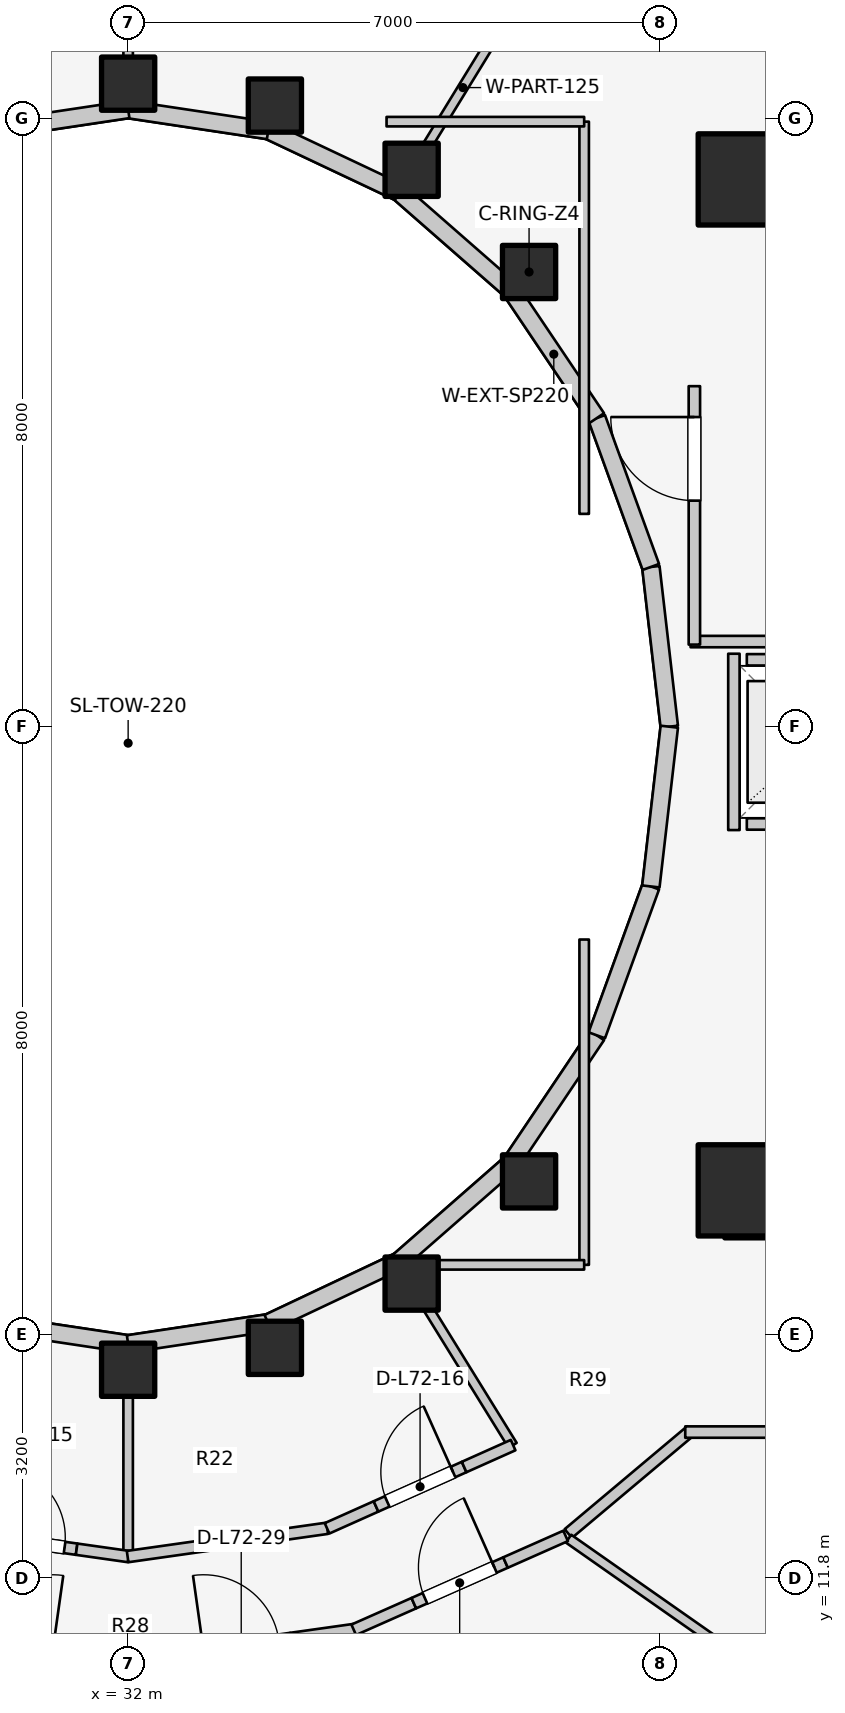
"""IFC4 building model, lengths in metres.
Left out: names, types, materials, properties, quantities, classifications, styles, units other than length and angle.
Written with IfcOpenShell. Run it as: python <this file> out.ifc"""

import sys

from ifc_helpers import new_model, si_unit, direction, frame, frame_2d, origin, origin_2d, place, context, subcontext, project, spatial, rectangle, extrude, element, fill, save


model = new_model("IFC4")
c1 = context("Model", 3, precision=1e-05, world=origin(), true_north=direction((0.0, 1.0)))
c2 = subcontext(c1, "Body", "Model", "MODEL_VIEW")
j1 = project(units=[si_unit("LENGTHUNIT", "METRE"), si_unit("PLANEANGLEUNIT", "RADIAN")], contexts=[c1])
p1 = place(None, origin())
s1 = spatial("IfcSite", under=j1, at=p1, CompositionType="ELEMENT")
p2 = place(p1, origin())
s2 = spatial("IfcBuilding", under=s1, at=p2, CompositionType="ELEMENT")
p3 = place(p2, frame((0.0, 0.0, 235.7)))
s3 = spatial("IfcBuildingStorey", under=s2, at=p3, CompositionType="ELEMENT", Elevation=235.7)
for number, where, z_axis, x_axis in (
    (1, (39.85, 16.55, 0.0), (0.0, 0.0, 1.0), (1.0, 0.0, 0.0)),
    (2, (39.85, 30.35, 0.0), (0.0, 0.0, 1.0), (1.0, 0.0, 0.0)),
):
    element("IfcWall", number, at=place(p3, frame(where, z_axis=z_axis, x_axis=x_axis)), inside=s3, PredefinedType="SHEAR", context=c2, shape_type="SweptSolid", body=[
        extrude(rectangle(XDim=4.5, YDim=0.55, at=frame_2d((2.25, 0.0))), origin(), (0.0, 0.0, 1.0), 3.1),
    ])
for number, where, z_axis, x_axis in (
    (3, (40.1, 16.9, 0.0), (0.0, 0.0, 1.0), (1.0, 0.0, 0.0)),
    (4, (40.1, 30.2, 0.0), (0.0, 0.0, 1.0), (1.0, 0.0, 0.0)),
):
    element("IfcColumn", number, at=place(p3, frame(where, z_axis=z_axis, x_axis=x_axis)), inside=s3, PredefinedType="COLUMN", context=c2, shape_type="SweptSolid", body=[
        extrude(rectangle(XDim=1.2, YDim=1.2, at=origin_2d()), origin(), (0.0, 0.0, 1.0), 3.1),
    ])
for number, where, z_axis, x_axis in (
    (5, (37.275, 28.982, 0.0), (0.0, 0.0, 1.0), (1.0, 0.0, 0.0)),
    (6, (35.73, 30.327, 0.0), (0.0, 0.0, 1.0), (1.0, 0.0, 0.0)),
    (7, (33.931, 31.172, 0.0), (0.0, 0.0, 1.0), (1.0, 0.0, 0.0)),
    (8, (32.0, 31.46, 0.0), (0.0, 0.0, 1.0), (1.0, 0.0, 0.0)),
    (9, (32.0, 14.54, 0.0), (0.0, 0.0, 1.0), (1.0, 0.0, 0.0)),
    (10, (33.931, 14.828, 0.0), (0.0, 0.0, 1.0), (1.0, 0.0, 0.0)),
    (11, (35.73, 15.673, 0.0), (0.0, 0.0, 1.0), (1.0, 0.0, 0.0)),
    (12, (37.275, 17.018, 0.0), (0.0, 0.0, 1.0), (1.0, 0.0, 0.0)),
):
    element("IfcColumn", number, at=place(p3, frame(where, z_axis=z_axis, x_axis=x_axis)), inside=s3, PredefinedType="COLUMN", context=c2, shape_type="SweptSolid", body=[
        extrude(rectangle(XDim=0.7, YDim=0.7, at=origin_2d()), origin(), (0.0, 0.0, 1.0), 3.1),
    ])
p4 = place(p3, frame((39.12, 23.0, 0.0), z_axis=(0.0, 0.0, 1.0), x_axis=(-0.114711713601, 0.993398823617, 0.0)))
e13 = element("IfcWall", 13, at=p4, inside=s3, PredefinedType="STANDARD", context=c2, shape_type="SweptSolid", body=[
    extrude(rectangle(XDim=2.115, YDim=0.23, at=frame_2d((1.058, 0.0))), origin(), (0.0, 0.0, 1.0), 2.56),
])
p5 = place(p3, frame((38.877, 25.102, 0.0), z_axis=(0.0, 0.0, 1.0), x_axis=(-0.341423187295, 0.93990968033, 0.0)))
e14 = element("IfcWall", 14, at=p5, inside=s3, PredefinedType="STANDARD", context=c2, shape_type="SweptSolid", body=[
    extrude(rectangle(XDim=2.084, YDim=0.23, at=frame_2d((1.042, 0.0))), origin(), (0.0, 0.0, 1.0), 2.56),
])
p6 = place(p3, frame((38.166, 27.06, 0.0), z_axis=(0.0, 0.0, 1.0), x_axis=(-0.558197800898, 0.829707909492, 0.0)))
e15 = element("IfcWall", 15, at=p6, inside=s3, PredefinedType="STANDARD", context=c2, shape_type="SweptSolid", body=[
    extrude(rectangle(XDim=2.027, YDim=0.23, at=frame_2d((1.013, 0.0))), origin(), (0.0, 0.0, 1.0), 1.22),
])
p7 = place(p3, frame((37.035, 28.742, 0.0), z_axis=(0.0, 0.0, 1.0), x_axis=(-0.752576694707, 0.658504607869, 0.0)))
e16 = element("IfcWall", 16, at=p7, inside=s3, PredefinedType="STANDARD", context=c2, shape_type="SweptSolid", body=[
    extrude(rectangle(XDim=1.959, YDim=0.23, at=frame_2d((0.98, 0.0))), origin(), (0.0, 0.0, 1.0), 1.22),
])
p8 = place(p3, frame((35.56, 30.032, 0.0), z_axis=(0.0, 0.0, 1.0), x_axis=(-0.904179699603, 0.427152280606, 0.0)))
e17 = element("IfcWall", 17, at=p8, inside=s3, PredefinedType="STANDARD", context=c2, shape_type="SweptSolid", body=[
    extrude(rectangle(XDim=1.899, YDim=0.23, at=frame_2d((0.95, 0.0))), origin(), (0.0, 0.0, 1.0), 1.22),
])
for number, where, z_axis, x_axis in (
    (18, (33.843, 30.843, 0.0), (0.0, 0.0, 1.0), (-0.989, 0.149, 0.0)),
    (19, (32.0, 31.12, 0.0), (0.0, 0.0, 1.0), (-0.989, -0.149, 0.0)),
    (20, (30.157, 15.157, 0.0), (0.0, 0.0, 1.0), (0.989, -0.149, 0.0)),
    (21, (32.0, 14.88, 0.0), (0.0, 0.0, 1.0), (0.989, 0.149, 0.0)),
):
    element("IfcWall", number, at=place(p3, frame(where, z_axis=z_axis, x_axis=x_axis)), inside=s3, PredefinedType="STANDARD", context=c2, shape_type="SweptSolid", body=[
        extrude(rectangle(XDim=1.864, YDim=0.23, at=frame_2d((0.932, 0.0))), origin(), (0.0, 0.0, 1.0), 1.22),
    ])
p9 = place(p3, frame((33.843, 15.157, 0.0), z_axis=(0.0, 0.0, 1.0), x_axis=(0.904179699603, 0.427152280606, 0.0)))
e22 = element("IfcWall", 22, at=p9, inside=s3, PredefinedType="STANDARD", context=c2, shape_type="SweptSolid", body=[
    extrude(rectangle(XDim=1.899, YDim=0.23, at=frame_2d((0.95, 0.0))), origin(), (0.0, 0.0, 1.0), 1.22),
])
p10 = place(p3, frame((35.56, 15.968, 0.0), z_axis=(0.0, 0.0, 1.0), x_axis=(0.752576694707, 0.658504607869, 0.0)))
e23 = element("IfcWall", 23, at=p10, inside=s3, PredefinedType="STANDARD", context=c2, shape_type="SweptSolid", body=[
    extrude(rectangle(XDim=1.959, YDim=0.23, at=frame_2d((0.98, 0.0))), origin(), (0.0, 0.0, 1.0), 1.22),
])
p11 = place(p3, frame((37.035, 17.258, 0.0), z_axis=(0.0, 0.0, 1.0), x_axis=(0.558197800898, 0.829707909492, 0.0)))
e24 = element("IfcWall", 24, at=p11, inside=s3, PredefinedType="STANDARD", context=c2, shape_type="SweptSolid", body=[
    extrude(rectangle(XDim=2.027, YDim=0.23, at=frame_2d((1.013, 0.0))), origin(), (0.0, 0.0, 1.0), 1.22),
])
p12 = place(p3, frame((38.166, 18.94, 0.0), z_axis=(0.0, 0.0, 1.0), x_axis=(0.341423187295, 0.93990968033, 0.0)))
e25 = element("IfcWall", 25, at=p12, inside=s3, PredefinedType="STANDARD", context=c2, shape_type="SweptSolid", body=[
    extrude(rectangle(XDim=2.084, YDim=0.23, at=frame_2d((1.042, 0.0))), origin(), (0.0, 0.0, 1.0), 2.56),
])
p13 = place(p3, frame((38.877, 20.898, 0.0), z_axis=(0.0, 0.0, 1.0), x_axis=(0.114711713601, 0.993398823617, 0.0)))
e26 = element("IfcWall", 26, at=p13, inside=s3, PredefinedType="STANDARD", context=c2, shape_type="SweptSolid", body=[
    extrude(rectangle(XDim=2.115, YDim=0.23, at=frame_2d((1.058, 0.0))), origin(), (0.0, 0.0, 1.0), 2.56),
])
p14 = place(p3, frame((40.14, 21.72, 0.0), z_axis=(0.0, 0.0, 1.0), x_axis=(1.0, 0.0, 0.0)))
e27 = element("IfcWall", 27, at=p14, inside=s3, PredefinedType="SOLIDWALL", context=c2, shape_type="SweptSolid", body=[
    extrude(rectangle(XDim=1.82, YDim=0.15, at=frame_2d((0.91, 0.0))), origin(), (0.0, 0.0, 1.0), 2.12),
])
p15 = place(p14, frame((0.36, 0.0, 0.0)))
e28 = element("IfcOpeningElement", 28, at=p15, cuts=e27, PredefinedType="OPENING", context=c2, shape_type="SweptSolid", body=[
    extrude(rectangle(XDim=1.1, YDim=2.1, at=frame_2d((0.55, 1.05))), frame((0.0, 0.085, 0.0), z_axis=(0.0, -1.0, 0.0), x_axis=(1.0, 0.0, 0.0)), (0.0, 0.0, 1.0), 0.17),
])
p16 = place(p3, frame((40.14, 23.88, 0.0), z_axis=(0.0, 0.0, 1.0), x_axis=(1.0, 0.0, 0.0)))
e29 = element("IfcWall", 29, at=p16, inside=s3, PredefinedType="SOLIDWALL", context=c2, shape_type="SweptSolid", body=[
    extrude(rectangle(XDim=1.82, YDim=0.15, at=frame_2d((0.91, 0.0))), origin(), (0.0, 0.0, 1.0), 2.12),
])
p17 = place(p3, frame((39.97, 21.64, 0.0), z_axis=(0.0, 0.0, 1.0), x_axis=(0.0, 1.0, 0.0)))
e30 = element("IfcWall", 30, at=p17, inside=s3, PredefinedType="SOLIDWALL", context=c2, shape_type="SweptSolid", body=[
    extrude(rectangle(XDim=2.32, YDim=0.15, at=frame_2d((1.16, 0.0))), origin(), (0.0, 0.0, 1.0), 2.12),
])
p18 = place(p3, frame((39.4, 24.12, 0.0), z_axis=(0.0, 0.0, 1.0), x_axis=(1.0, 0.0, 0.0)))
e31 = element("IfcWall", 31, at=p18, inside=s3, PredefinedType="PARTITIONING", context=c2, shape_type="SweptSolid", body=[
    extrude(rectangle(XDim=5.08, YDim=0.15, at=frame_2d((2.54, 0.0))), origin(), (0.0, 0.0, 1.0), 2.12),
])
p19 = place(p3, frame((39.45, 24.08, 0.0), z_axis=(0.0, 0.0, 1.0), x_axis=(0.0, 1.0, 0.0)))
e32 = element("IfcWall", 32, at=p19, inside=s3, PredefinedType="PARTITIONING", context=c2, shape_type="SweptSolid", body=[
    extrude(rectangle(XDim=3.4, YDim=0.15, at=frame_2d((1.7, 0.0))), origin(), (0.0, 0.0, 1.0), 2.575),
])
p20 = place(p19, frame((1.894, 0.0, 0.0)))
e33 = element("IfcOpeningElement", 33, at=p20, cuts=e32, PredefinedType="OPENING", context=c2, shape_type="SweptSolid", body=[
    extrude(rectangle(XDim=1.1, YDim=2.1, at=frame_2d((0.55, 1.05))), frame((0.0, 0.085, 0.0), z_axis=(0.0, -1.0, 0.0), x_axis=(1.0, 0.0, 0.0)), (0.0, 0.0, 1.0), 0.17),
])
p21 = place(p3, frame((35.55, 30.015, 0.0), z_axis=(0.0, 0.0, 1.0), x_axis=(0.522763432117, 0.852477796802, 0.0)))
e34 = element("IfcWall", 34, at=p21, inside=s3, PredefinedType="PARTITIONING", context=c2, shape_type="SweptSolid", body=[
    extrude(rectangle(XDim=3.269, YDim=0.125, at=frame_2d((1.635, 0.0))), origin(), (0.0, 0.0, 1.0), 1.22),
])
p22 = place(p3, frame((32.0, 31.1, 0.0), z_axis=(0.0, 0.0, 1.0), x_axis=(0.0, 1.0, 0.0)))
e35 = element("IfcWall", 35, at=p22, inside=s3, PredefinedType="PARTITIONING", context=c2, shape_type="SweptSolid", body=[
    extrude(rectangle(XDim=3.218, YDim=0.125, at=frame_2d((1.609, 0.0))), origin(), (0.0, 0.0, 1.0), 1.22),
])
p23 = place(p3, frame((32.0, 14.9, 0.0), z_axis=(0.0, 0.0, 1.0), x_axis=(0.0, -1.0, 0.0)))
e36 = element("IfcWall", 36, at=p23, inside=s3, PredefinedType="PARTITIONING", context=c2, shape_type="SweptSolid", body=[
    extrude(rectangle(XDim=2.818, YDim=0.125, at=frame_2d((1.409, 0.0))), origin(), (0.0, 0.0, 1.0), 2.096),
])
p24 = place(p3, frame((35.55, 15.985, 0.0), z_axis=(0.0, 0.0, 1.0), x_axis=(0.52592395012, -0.850531597702, 0.0)))
e37 = element("IfcWall", 37, at=p24, inside=s3, PredefinedType="PARTITIONING", context=c2, shape_type="SweptSolid", body=[
    extrude(rectangle(XDim=2.869, YDim=0.125, at=frame_2d((1.435, 0.0))), origin(), (0.0, 0.0, 1.0), 2.096),
])
p25 = place(p3, frame((30.065, 12.357, 0.0), z_axis=(0.0, 0.0, 1.0), x_axis=(0.990102710588, -0.140344656064, 0.0)))
e38 = element("IfcWall", 38, at=p25, inside=s3, PredefinedType="PARTITIONING", context=c2, shape_type="SweptSolid", body=[
    extrude(rectangle(XDim=1.27, YDim=0.15, at=frame_2d((0.635, 0.0))), origin(), (0.0, 0.0, 1.0), 2.575),
])
p26 = place(p25, frame((0.16, 0.0, 0.0)))
e39 = element("IfcOpeningElement", 39, at=p26, cuts=e38, PredefinedType="OPENING", context=c2, shape_type="SweptSolid", body=[
    extrude(rectangle(XDim=0.95, YDim=2.1, at=frame_2d((0.475, 1.05))), frame((0.0, 0.085, 0.0), z_axis=(0.0, -1.0, 0.0), x_axis=(1.0, 0.0, 0.0)), (0.0, 0.0, 1.0), 0.17),
])
p27 = place(p3, frame((31.322, 12.179, 0.0), z_axis=(0.0, 0.0, 1.0), x_axis=(0.990090139669, -0.140433312754, 0.0)))
e40 = element("IfcWall", 40, at=p27, inside=s3, PredefinedType="PARTITIONING", context=c2, shape_type="SweptSolid", body=[
    extrude(rectangle(XDim=0.692, YDim=0.15, at=frame_2d((0.346, 0.0))), origin(), (0.0, 0.0, 1.0), 2.096),
])
p28 = place(p3, frame((31.993, 12.082, 0.0), z_axis=(0.0, 0.0, 1.0), x_axis=(0.990096156252, 0.140390887794, 0.0)))
e41 = element("IfcWall", 41, at=p28, inside=s3, PredefinedType="PARTITIONING", context=c2, shape_type="SweptSolid", body=[
    extrude(rectangle(XDim=2.654, YDim=0.15, at=frame_2d((1.327, 0.0))), origin(), (0.0, 0.0, 1.0), 2.096),
])
p29 = place(p3, frame((34.617, 12.454, 0.0), z_axis=(0.0, 0.0, 1.0), x_axis=(0.912953893823, 0.408062725269, 0.0)))
e42 = element("IfcWall", 42, at=p29, inside=s3, PredefinedType="PARTITIONING", context=c2, shape_type="SweptSolid", body=[
    extrude(rectangle(XDim=0.706, YDim=0.15, at=frame_2d((0.353, 0.0))), origin(), (0.0, 0.0, 1.0), 2.096),
])
p30 = place(p3, frame((35.261, 12.742, 0.0), z_axis=(0.0, 0.0, 1.0), x_axis=(0.912825795494, 0.408349197479, 0.0)))
e43 = element("IfcWall", 43, at=p30, inside=s3, PredefinedType="PARTITIONING", context=c2, shape_type="SweptSolid", body=[
    extrude(rectangle(XDim=1.27, YDim=0.15, at=frame_2d((0.635, 0.0))), origin(), (0.0, 0.0, 1.0), 2.16),
])
p31 = place(p30, frame((0.16, 0.0, 0.0)))
e44 = element("IfcOpeningElement", 44, at=p31, cuts=e43, PredefinedType="OPENING", context=c2, shape_type="SweptSolid", body=[
    extrude(rectangle(XDim=0.95, YDim=2.1, at=frame_2d((0.475, 1.05))), frame((0.0, 0.085, 0.0), z_axis=(0.0, -1.0, 0.0), x_axis=(1.0, 0.0, 0.0)), (0.0, 0.0, 1.0), 0.17),
])
p32 = place(p3, frame((36.421, 13.26, 0.0), z_axis=(0.0, 0.0, 1.0), x_axis=(0.912825035427, 0.40835089653, 0.0)))
e45 = element("IfcWall", 45, at=p32, inside=s3, PredefinedType="PARTITIONING", context=c2, shape_type="SweptSolid", body=[
    extrude(rectangle(XDim=0.706, YDim=0.15, at=frame_2d((0.353, 0.0))), origin(), (0.0, 0.0, 1.0), 2.575),
])
p33 = place(p3, frame((38.0, 25.8, 0.0), z_axis=(0.0, 0.0, 1.0), x_axis=(0.0, 1.0, 0.0)))
e46 = element("IfcWall", 46, at=p33, inside=s3, PredefinedType="PARTITIONING", context=c2, shape_type="SweptSolid", body=[
    extrude(rectangle(XDim=5.16, YDim=0.125, at=frame_2d((2.58, 0.0))), origin(), (0.0, 0.0, 1.0), 1.952),
])
p34 = place(p3, frame((35.4, 30.96, 0.0), z_axis=(0.0, 0.0, 1.0), x_axis=(1.0, 0.0, 0.0)))
e47 = element("IfcWall", 47, at=p34, inside=s3, PredefinedType="PARTITIONING", context=c2, shape_type="SweptSolid", body=[
    extrude(rectangle(XDim=2.6, YDim=0.125, at=frame_2d((1.3, 0.0))), origin(), (0.0, 0.0, 1.0), 1.22),
])
p35 = place(p3, frame((38.0, 15.92, 0.0), z_axis=(0.0, 0.0, 1.0), x_axis=(0.0, 1.0, 0.0)))
e48 = element("IfcWall", 48, at=p35, inside=s3, PredefinedType="PARTITIONING", context=c2, shape_type="SweptSolid", body=[
    extrude(rectangle(XDim=4.28, YDim=0.125, at=frame_2d((2.14, 0.0))), origin(), (0.0, 0.0, 1.0), 1.952),
])
p36 = place(p3, frame((35.4, 15.92, 0.0), z_axis=(0.0, 0.0, 1.0), x_axis=(1.0, 0.0, 0.0)))
e49 = element("IfcWall", 49, at=p36, inside=s3, PredefinedType="PARTITIONING", context=c2, shape_type="SweptSolid", body=[
    extrude(rectangle(XDim=2.6, YDim=0.125, at=frame_2d((1.3, 0.0))), origin(), (0.0, 0.0, 1.0), 1.952),
])
p37 = place(p3, frame((37.791, 12.385, 0.0), z_axis=(0.0, 0.0, 1.0), x_axis=(0.765677451641, 0.643224719711, 0.0)))
e50 = element("IfcWall", 50, at=p37, inside=s3, PredefinedType="PARTITIONING", context=c2, shape_type="SweptSolid", body=[
    extrude(rectangle(XDim=2.105, YDim=0.15, at=frame_2d((1.053, 0.0))), origin(), (0.0, 0.0, 1.0), 2.096),
])
p38 = place(p3, frame((39.33, 13.72, 0.0), z_axis=(0.0, 0.0, 1.0), x_axis=(1.0, 0.0, 0.0)))
e51 = element("IfcWall", 51, at=p38, inside=s3, PredefinedType="PARTITIONING", context=c2, shape_type="SweptSolid", body=[
    extrude(rectangle(XDim=5.06, YDim=0.15, at=frame_2d((2.53, 0.0))), origin(), (0.0, 0.0, 1.0), 2.096),
])
p39 = place(p3, frame((35.008, 11.077, 0.0), z_axis=(0.0, 0.0, 1.0), x_axis=(0.590771495169, -0.806838918555, 0.0)))
e52 = element("IfcWall", 52, at=p39, inside=s3, PredefinedType="PARTITIONING", context=c2, shape_type="SweptSolid", body=[
    extrude(rectangle(XDim=6.347, YDim=0.125, at=frame_2d((3.173, 0.0))), origin(), (0.0, 0.0, 1.0), 1.22),
])
p40 = place(p3, frame((37.794, 12.318, 0.0), z_axis=(0.0, 0.0, 1.0), x_axis=(0.819017716307, -0.573768228796, 0.0)))
e53 = element("IfcWall", 53, at=p40, inside=s3, PredefinedType="PARTITIONING", context=c2, shape_type="SweptSolid", body=[
    extrude(rectangle(XDim=6.802, YDim=0.125, at=frame_2d((3.401, 0.0))), origin(), (0.0, 0.0, 1.0), 1.22),
])
p41 = place(p3, frame((34.141, 11.005, 0.0), z_axis=(0.0, 0.0, 1.0), x_axis=(0.99022315503, 0.139492305317, 0.0)))
e54 = element("IfcWall", 54, at=p41, inside=s3, PredefinedType="PARTITIONING", context=c2, shape_type="SweptSolid", body=[
    extrude(rectangle(XDim=0.851, YDim=0.15, at=frame_2d((0.425, 0.0))), origin(), (0.0, 0.0, 1.0), 2.575),
])
p42 = place(p3, frame((34.968, 11.119, 0.0), z_axis=(0.0, 0.0, 1.0), x_axis=(0.914346402493, 0.40493290339, 0.0)))
e55 = element("IfcWall", 55, at=p42, inside=s3, PredefinedType="PARTITIONING", context=c2, shape_type="SweptSolid", body=[
    extrude(rectangle(XDim=0.865, YDim=0.15, at=frame_2d((0.432, 0.0))), origin(), (0.0, 0.0, 1.0), 2.096),
])
p43 = place(p3, frame((35.759, 11.469, 0.0), z_axis=(0.0, 0.0, 1.0), x_axis=(0.914314172667, 0.405005671145, 0.0)))
e56 = element("IfcWall", 56, at=p43, inside=s3, PredefinedType="PARTITIONING", context=c2, shape_type="SweptSolid", body=[
    extrude(rectangle(XDim=1.32, YDim=0.15, at=frame_2d((0.66, 0.0))), origin(), (0.0, 0.0, 1.0), 2.16),
])
p44 = place(p43, frame((0.16, 0.0, 0.0)))
e57 = element("IfcOpeningElement", 57, at=p44, cuts=e56, PredefinedType="OPENING", context=c2, shape_type="SweptSolid", body=[
    extrude(rectangle(XDim=1.0, YDim=2.1, at=frame_2d((0.5, 1.05))), frame((0.0, 0.085, 0.0), z_axis=(0.0, -1.0, 0.0), x_axis=(1.0, 0.0, 0.0)), (0.0, 0.0, 1.0), 0.17),
])
p45 = place(p3, frame((36.966, 12.004, 0.0), z_axis=(0.0, 0.0, 1.0), x_axis=(0.914241833088, 0.405168940853, 0.0)))
e58 = element("IfcWall", 58, at=p45, inside=s3, PredefinedType="PARTITIONING", context=c2, shape_type="SweptSolid", body=[
    extrude(rectangle(XDim=0.865, YDim=0.15, at=frame_2d((0.432, 0.0))), origin(), (0.0, 0.0, 1.0), 2.575),
])
p46 = place(p20, origin())
e59 = element("IfcDoor", 59, at=p46, inside=s3, OperationType="SINGLE_SWING_RIGHT", PredefinedType="DOOR", context=c2, shape_type="SweptSolid", body=[
    extrude(rectangle(XDim=1.1, YDim=2.1, at=frame_2d((0.55, 1.05))), frame((0.0, 0.025, 0.0), z_axis=(0.0, -1.0, 0.0), x_axis=(1.0, 0.0, 0.0)), (0.0, 0.0, 1.0), 0.05),
])
fill(e33, e59)
p47 = place(p26, origin())
e60 = element("IfcDoor", 60, at=p47, inside=s3, OperationType="SINGLE_SWING_LEFT", PredefinedType="DOOR", context=c2, shape_type="SweptSolid", body=[
    extrude(rectangle(XDim=0.95, YDim=2.1, at=frame_2d((0.475, 1.05))), frame((0.0, 0.025, 0.0), z_axis=(0.0, -1.0, 0.0), x_axis=(1.0, 0.0, 0.0)), (0.0, 0.0, 1.0), 0.05),
])
fill(e39, e60)
p48 = place(p31, origin())
e61 = element("IfcDoor", 61, at=p48, inside=s3, OperationType="SINGLE_SWING_RIGHT", PredefinedType="DOOR", context=c2, shape_type="SweptSolid", body=[
    extrude(rectangle(XDim=0.95, YDim=2.1, at=frame_2d((0.475, 1.05))), frame((0.0, 0.025, 0.0), z_axis=(0.0, -1.0, 0.0), x_axis=(1.0, 0.0, 0.0)), (0.0, 0.0, 1.0), 0.05),
])
fill(e44, e61)
p49 = place(p44, origin())
e62 = element("IfcDoor", 62, at=p49, inside=s3, OperationType="SINGLE_SWING_RIGHT", PredefinedType="DOOR", context=c2, shape_type="SweptSolid", body=[
    extrude(rectangle(XDim=1.0, YDim=2.1, at=frame_2d((0.5, 1.05))), frame((0.0, 0.025, 0.0), z_axis=(0.0, -1.0, 0.0), x_axis=(1.0, 0.0, 0.0)), (0.0, 0.0, 1.0), 0.05),
])
fill(e57, e62)
save(model, sys.argv[1])
